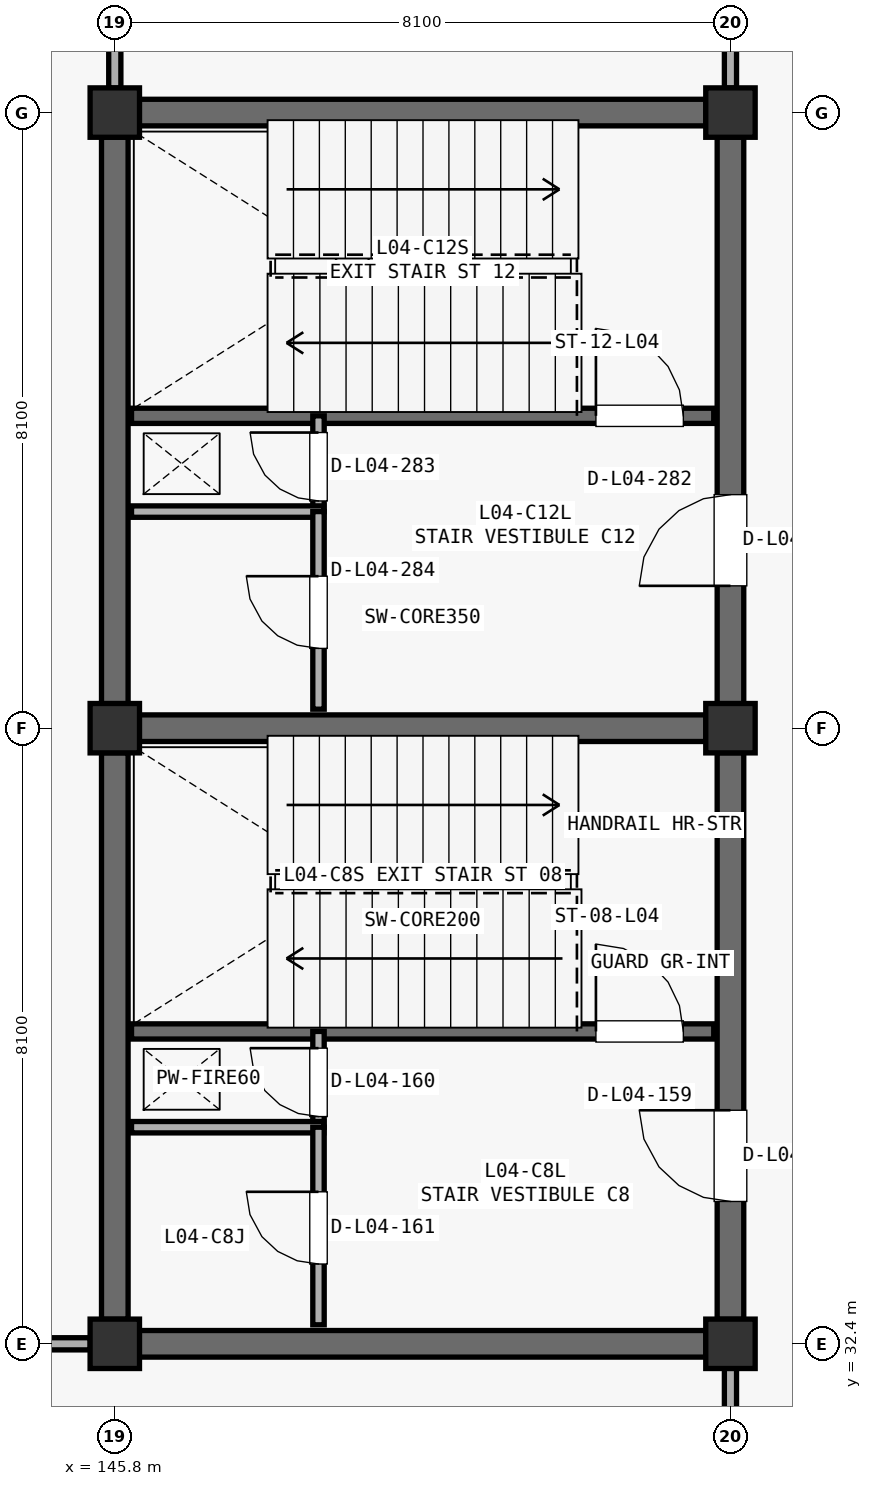
"""IFC4 building model, lengths in metres.
Left out: names, types, materials, properties, quantities, classifications, styles, units other than length and angle.
Written with IfcOpenShell. Run it as: python <this file> out.ifc"""

import sys

from ifc_helpers import new_model, si_unit, direction, frame, frame_2d, origin, origin_2d, place, context, subcontext, project, spatial, rectangle, extrude, element, fill, save


model = new_model("IFC4")
c1 = context("Model", 3, precision=1e-05, world=origin(), true_north=direction((0.0, 1.0)))
c2 = subcontext(c1, "Body", "Model", "MODEL_VIEW")
j1 = project(units=[si_unit("LENGTHUNIT", "METRE"), si_unit("PLANEANGLEUNIT", "RADIAN")], contexts=[c1])
p1 = place(None, origin())
s1 = spatial("IfcSite", under=j1, at=p1, CompositionType="ELEMENT")
p2 = place(p1, origin())
s2 = spatial("IfcBuilding", under=s1, at=p2, CompositionType="ELEMENT")
p3 = place(p2, frame((0.0, 0.0, 18.53)))
s3 = spatial("IfcBuildingStorey", under=s2, at=p3, CompositionType="ELEMENT", Elevation=18.53)
for number, where, z_axis, x_axis in (
    (1, (145.8, 32.4, 0.0), (0.0, 0.0, 1.0), (1.0, 0.0, 0.0)),
    (2, (145.8, 40.5, 0.0), (0.0, 0.0, 1.0), (1.0, 0.0, 0.0)),
    (3, (145.8, 48.6, 0.0), (0.0, 0.0, 1.0), (1.0, 0.0, 0.0)),
    (4, (153.9, 32.4, 0.0), (0.0, 0.0, 1.0), (1.0, 0.0, 0.0)),
    (5, (153.9, 40.5, 0.0), (0.0, 0.0, 1.0), (1.0, 0.0, 0.0)),
    (6, (153.9, 48.6, 0.0), (0.0, 0.0, 1.0), (1.0, 0.0, 0.0)),
):
    element("IfcColumn", number, at=place(p3, frame(where, z_axis=z_axis, x_axis=x_axis)), inside=s3, PredefinedType="COLUMN", context=c2, shape_type="SweptSolid", body=[
        extrude(rectangle(XDim=0.65, YDim=0.65, at=origin_2d()), origin(), (0.0, 0.0, 1.0), 4.42),
    ])
p4 = place(p3, frame((146.123, 40.5, 0.0), z_axis=(0.0, 0.0, 1.0), x_axis=(1.0, 0.0, 0.0)))
e7 = element("IfcWall", 7, at=p4, inside=s3, PredefinedType="SHEAR", context=c2, shape_type="SweptSolid", body=[
    extrude(rectangle(XDim=7.454, YDim=0.35, at=frame_2d((3.727, 0.0))), origin(), (0.0, 0.0, 1.0), 4.162),
])
p5 = place(p3, frame((145.8, 32.723, 0.0), z_axis=(0.0, 0.0, 1.0), x_axis=(0.0, 1.0, 0.0)))
e8 = element("IfcWall", 8, at=p5, inside=s3, PredefinedType="SHEAR", context=c2, shape_type="SweptSolid", body=[
    extrude(rectangle(XDim=7.454, YDim=0.35, at=frame_2d((3.727, 0.0))), origin(), (0.0, 0.0, 1.0), 4.162),
])
p6 = place(p3, frame((153.9, 32.723, 0.0), z_axis=(0.0, 0.0, 1.0), x_axis=(0.0, 1.0, 0.0)))
e9 = element("IfcWall", 9, at=p6, inside=s3, PredefinedType="SHEAR", context=c2, shape_type="SweptSolid", body=[
    extrude(rectangle(XDim=7.454, YDim=0.35, at=frame_2d((3.727, 0.0))), origin(), (0.0, 0.0, 1.0), 4.162),
])
p7 = place(p6, frame((1.55, 0.0, 0.0)))
e10 = element("IfcOpeningElement", 10, at=p7, cuts=e9, PredefinedType="OPENING", context=c2, shape_type="SweptSolid", body=[
    extrude(rectangle(XDim=1.2, YDim=2.2, at=frame_2d((0.6, 1.1))), frame((0.0, 0.185, 0.0), z_axis=(0.0, -1.0, 0.0), x_axis=(1.0, 0.0, 0.0)), (0.0, 0.0, 1.0), 0.37),
])
p8 = place(p3, frame((146.123, 32.4, 0.0), z_axis=(0.0, 0.0, 1.0), x_axis=(1.0, 0.0, 0.0)))
e11 = element("IfcWall", 11, at=p8, inside=s3, PredefinedType="SHEAR", context=c2, shape_type="SweptSolid", body=[
    extrude(rectangle(XDim=7.454, YDim=0.35, at=frame_2d((3.727, 0.0))), origin(), (0.0, 0.0, 1.0), 4.162),
])
p9 = place(p3, frame((146.02, 36.51, 0.0), z_axis=(0.0, 0.0, 1.0), x_axis=(1.0, 0.0, 0.0)))
e12 = element("IfcWall", 12, at=p9, inside=s3, PredefinedType="SHEAR", context=c2, shape_type="SweptSolid", body=[
    extrude(rectangle(XDim=7.66, YDim=0.2, at=frame_2d((3.83, 0.0))), origin(), (0.0, 0.0, 1.0), 4.162),
])
p10 = place(p9, frame((6.11, 0.0, 0.0)))
e13 = element("IfcOpeningElement", 13, at=p10, cuts=e12, PredefinedType="OPENING", context=c2, shape_type="SweptSolid", body=[
    extrude(rectangle(XDim=1.15, YDim=2.2, at=frame_2d((0.575, 1.1))), frame((0.0, 0.11, 0.0), z_axis=(0.0, -1.0, 0.0), x_axis=(1.0, 0.0, 0.0)), (0.0, 0.0, 1.0), 0.22),
])
p11 = place(p3, frame((148.48, 35.25, 0.0), z_axis=(0.0, 0.0, 1.0), x_axis=(0.0, 1.0, 0.0)))
e14 = element("IfcWall", 14, at=p11, inside=s3, PredefinedType="PARTITIONING", context=c2, shape_type="SweptSolid", body=[
    extrude(rectangle(XDim=1.26, YDim=0.15, at=frame_2d((0.63, 0.0))), origin(), (0.0, 0.0, 1.0), 4.162),
])
p12 = place(p11, frame((0.14, 0.0, 0.0)))
e15 = element("IfcOpeningElement", 15, at=p12, cuts=e14, PredefinedType="OPENING", context=c2, shape_type="SweptSolid", body=[
    extrude(rectangle(XDim=0.9, YDim=2.15, at=frame_2d((0.45, 1.075))), frame((0.0, 0.085, 0.0), z_axis=(0.0, -1.0, 0.0), x_axis=(1.0, 0.0, 0.0)), (0.0, 0.0, 1.0), 0.17),
])
p13 = place(p3, frame((146.02, 35.25, 0.0), z_axis=(0.0, 0.0, 1.0), x_axis=(1.0, 0.0, 0.0)))
e16 = element("IfcWall", 16, at=p13, inside=s3, PredefinedType="PARTITIONING", context=c2, shape_type="SweptSolid", body=[
    extrude(rectangle(XDim=2.53, YDim=0.15, at=frame_2d((1.265, 0.0))), origin(), (0.0, 0.0, 1.0), 4.162),
])
p14 = place(p3, frame((148.48, 32.65, 0.0), z_axis=(0.0, 0.0, 1.0), x_axis=(0.0, 1.0, 0.0)))
e17 = element("IfcWall", 17, at=p14, inside=s3, PredefinedType="PARTITIONING", context=c2, shape_type="SweptSolid", body=[
    extrude(rectangle(XDim=2.6, YDim=0.15, at=frame_2d((1.3, 0.0))), origin(), (0.0, 0.0, 1.0), 4.162),
])
p15 = place(p14, frame((0.8, 0.0, 0.0)))
e18 = element("IfcOpeningElement", 18, at=p15, cuts=e17, PredefinedType="OPENING", context=c2, shape_type="SweptSolid", body=[
    extrude(rectangle(XDim=0.95, YDim=2.15, at=frame_2d((0.475, 1.075))), frame((0.0, 0.085, 0.0), z_axis=(0.0, -1.0, 0.0), x_axis=(1.0, 0.0, 0.0)), (0.0, 0.0, 1.0), 0.17),
])
p16 = place(p3, frame((146.123, 48.6, 0.0), z_axis=(0.0, 0.0, 1.0), x_axis=(1.0, 0.0, 0.0)))
e19 = element("IfcWall", 19, at=p16, inside=s3, PredefinedType="SHEAR", context=c2, shape_type="SweptSolid", body=[
    extrude(rectangle(XDim=7.454, YDim=0.35, at=frame_2d((3.727, 0.0))), origin(), (0.0, 0.0, 1.0), 4.162),
])
p17 = place(p3, frame((145.8, 40.823, 0.0), z_axis=(0.0, 0.0, 1.0), x_axis=(0.0, 1.0, 0.0)))
e20 = element("IfcWall", 20, at=p17, inside=s3, PredefinedType="SHEAR", context=c2, shape_type="SweptSolid", body=[
    extrude(rectangle(XDim=7.454, YDim=0.35, at=frame_2d((3.727, 0.0))), origin(), (0.0, 0.0, 1.0), 4.162),
])
p18 = place(p3, frame((153.9, 40.823, 0.0), z_axis=(0.0, 0.0, 1.0), x_axis=(0.0, 1.0, 0.0)))
e21 = element("IfcWall", 21, at=p18, inside=s3, PredefinedType="SHEAR", context=c2, shape_type="SweptSolid", body=[
    extrude(rectangle(XDim=7.454, YDim=0.35, at=frame_2d((3.727, 0.0))), origin(), (0.0, 0.0, 1.0), 4.162),
])
p19 = place(p18, frame((1.55, 0.0, 0.0)))
e22 = element("IfcOpeningElement", 22, at=p19, cuts=e21, PredefinedType="OPENING", context=c2, shape_type="SweptSolid", body=[
    extrude(rectangle(XDim=1.2, YDim=2.2, at=frame_2d((0.6, 1.1))), frame((0.0, 0.185, 0.0), z_axis=(0.0, -1.0, 0.0), x_axis=(1.0, 0.0, 0.0)), (0.0, 0.0, 1.0), 0.37),
])
p20 = place(p3, frame((146.02, 44.61, 0.0), z_axis=(0.0, 0.0, 1.0), x_axis=(1.0, 0.0, 0.0)))
e23 = element("IfcWall", 23, at=p20, inside=s3, PredefinedType="SHEAR", context=c2, shape_type="SweptSolid", body=[
    extrude(rectangle(XDim=7.66, YDim=0.2, at=frame_2d((3.83, 0.0))), origin(), (0.0, 0.0, 1.0), 4.162),
])
p21 = place(p20, frame((6.11, 0.0, 0.0)))
e24 = element("IfcOpeningElement", 24, at=p21, cuts=e23, PredefinedType="OPENING", context=c2, shape_type="SweptSolid", body=[
    extrude(rectangle(XDim=1.15, YDim=2.2, at=frame_2d((0.575, 1.1))), frame((0.0, 0.11, 0.0), z_axis=(0.0, -1.0, 0.0), x_axis=(1.0, 0.0, 0.0)), (0.0, 0.0, 1.0), 0.22),
])
p22 = place(p3, frame((148.48, 43.35, 0.0), z_axis=(0.0, 0.0, 1.0), x_axis=(0.0, 1.0, 0.0)))
e25 = element("IfcWall", 25, at=p22, inside=s3, PredefinedType="PARTITIONING", context=c2, shape_type="SweptSolid", body=[
    extrude(rectangle(XDim=1.26, YDim=0.15, at=frame_2d((0.63, 0.0))), origin(), (0.0, 0.0, 1.0), 4.162),
])
p23 = place(p22, frame((0.14, 0.0, 0.0)))
e26 = element("IfcOpeningElement", 26, at=p23, cuts=e25, PredefinedType="OPENING", context=c2, shape_type="SweptSolid", body=[
    extrude(rectangle(XDim=0.9, YDim=2.15, at=frame_2d((0.45, 1.075))), frame((0.0, 0.085, 0.0), z_axis=(0.0, -1.0, 0.0), x_axis=(1.0, 0.0, 0.0)), (0.0, 0.0, 1.0), 0.17),
])
p24 = place(p3, frame((146.02, 43.35, 0.0), z_axis=(0.0, 0.0, 1.0), x_axis=(1.0, 0.0, 0.0)))
e27 = element("IfcWall", 27, at=p24, inside=s3, PredefinedType="PARTITIONING", context=c2, shape_type="SweptSolid", body=[
    extrude(rectangle(XDim=2.53, YDim=0.15, at=frame_2d((1.265, 0.0))), origin(), (0.0, 0.0, 1.0), 4.162),
])
p25 = place(p3, frame((148.48, 40.75, 0.0), z_axis=(0.0, 0.0, 1.0), x_axis=(0.0, 1.0, 0.0)))
e28 = element("IfcWall", 28, at=p25, inside=s3, PredefinedType="PARTITIONING", context=c2, shape_type="SweptSolid", body=[
    extrude(rectangle(XDim=2.6, YDim=0.15, at=frame_2d((1.3, 0.0))), origin(), (0.0, 0.0, 1.0), 4.162),
])
p26 = place(p25, frame((0.8, 0.0, 0.0)))
e29 = element("IfcOpeningElement", 29, at=p26, cuts=e28, PredefinedType="OPENING", context=c2, shape_type="SweptSolid", body=[
    extrude(rectangle(XDim=0.95, YDim=2.15, at=frame_2d((0.475, 1.075))), frame((0.0, 0.085, 0.0), z_axis=(0.0, -1.0, 0.0), x_axis=(1.0, 0.0, 0.0)), (0.0, 0.0, 1.0), 0.17),
])
p27 = place(p3, frame((153.9, 24.623, 0.0), z_axis=(0.0, 0.0, 1.0), x_axis=(0.0, 1.0, 0.0)))
e30 = element("IfcWall", 30, at=p27, inside=s3, PredefinedType="PARTITIONING", context=c2, shape_type="SweptSolid", body=[
    extrude(rectangle(XDim=7.454, YDim=0.16, at=frame_2d((3.727, 0.0))), origin(), (0.0, 0.0, 1.0), 3.512),
])
p28 = place(p3, frame((138.023, 32.4, 0.0), z_axis=(0.0, 0.0, 1.0), x_axis=(1.0, 0.0, 0.0)))
e31 = element("IfcWall", 31, at=p28, inside=s3, PredefinedType="PARTITIONING", context=c2, shape_type="SweptSolid", body=[
    extrude(rectangle(XDim=7.454, YDim=0.16, at=frame_2d((3.727, 0.0))), origin(), (0.0, 0.0, 1.0), 3.512),
])
p29 = place(p3, frame((145.8, 48.923, 0.0), z_axis=(0.0, 0.0, 1.0), x_axis=(0.0, 1.0, 0.0)))
e32 = element("IfcWall", 32, at=p29, inside=s3, PredefinedType="PARTITIONING", context=c2, shape_type="SweptSolid", body=[
    extrude(rectangle(XDim=7.454, YDim=0.16, at=frame_2d((3.727, 0.0))), origin(), (0.0, 0.0, 1.0), 3.562),
])
p30 = place(p29, frame((3.127, 0.0, 0.0)))
e33 = element("IfcOpeningElement", 33, at=p30, cuts=e32, PredefinedType="OPENING", context=c2, shape_type="SweptSolid", body=[
    extrude(rectangle(XDim=1.2, YDim=2.2, at=frame_2d((0.6, 1.1))), frame((0.0, 0.09, 0.0), z_axis=(0.0, -1.0, 0.0), x_axis=(1.0, 0.0, 0.0)), (0.0, 0.0, 1.0), 0.18),
])
p31 = place(p3, frame((153.9, 48.923, 0.0), z_axis=(0.0, 0.0, 1.0), x_axis=(0.0, 1.0, 0.0)))
e34 = element("IfcWall", 34, at=p31, inside=s3, PredefinedType="PARTITIONING", context=c2, shape_type="SweptSolid", body=[
    extrude(rectangle(XDim=7.454, YDim=0.16, at=frame_2d((3.727, 0.0))), origin(), (0.0, 0.0, 1.0), 3.212),
])
p32 = place(p31, frame((2.867, 0.0, 0.0)))
e35 = element("IfcOpeningElement", 35, at=p32, cuts=e34, PredefinedType="OPENING", context=c2, shape_type="SweptSolid", body=[
    extrude(rectangle(XDim=1.72, YDim=2.3, at=frame_2d((0.86, 1.15))), frame((0.0, 0.09, 0.0), z_axis=(0.0, -1.0, 0.0), x_axis=(1.0, 0.0, 0.0)), (0.0, 0.0, 1.0), 0.18),
])
p33 = place(p7, origin())
e36 = element("IfcDoor", 36, at=p33, inside=s3, OperationType="SINGLE_SWING_RIGHT", PredefinedType="DOOR", context=c2, shape_type="SweptSolid", body=[
    extrude(rectangle(XDim=1.2, YDim=2.2, at=frame_2d((0.6, 1.1))), frame((0.0, 0.025, 0.0), z_axis=(0.0, -1.0, 0.0), x_axis=(1.0, 0.0, 0.0)), (0.0, 0.0, 1.0), 0.05),
])
fill(e10, e36)
p34 = place(p10, origin())
e37 = element("IfcDoor", 37, at=p34, inside=s3, OperationType="SINGLE_SWING_LEFT", PredefinedType="DOOR", context=c2, shape_type="SweptSolid", body=[
    extrude(rectangle(XDim=1.15, YDim=2.2, at=frame_2d((0.575, 1.1))), frame((0.0, 0.025, 0.0), z_axis=(0.0, -1.0, 0.0), x_axis=(1.0, 0.0, 0.0)), (0.0, 0.0, 1.0), 0.05),
])
fill(e13, e37)
p35 = place(p12, origin())
e38 = element("IfcDoor", 38, at=p35, inside=s3, OperationType="SINGLE_SWING_RIGHT", PredefinedType="DOOR", context=c2, shape_type="SweptSolid", body=[
    extrude(rectangle(XDim=0.9, YDim=2.15, at=frame_2d((0.45, 1.075))), frame((0.0, 0.025, 0.0), z_axis=(0.0, -1.0, 0.0), x_axis=(1.0, 0.0, 0.0)), (0.0, 0.0, 1.0), 0.05),
])
fill(e15, e38)
p36 = place(p15, origin())
e39 = element("IfcDoor", 39, at=p36, inside=s3, OperationType="SINGLE_SWING_RIGHT", PredefinedType="DOOR", context=c2, shape_type="SweptSolid", body=[
    extrude(rectangle(XDim=0.95, YDim=2.15, at=frame_2d((0.475, 1.075))), frame((0.0, 0.025, 0.0), z_axis=(0.0, -1.0, 0.0), x_axis=(1.0, 0.0, 0.0)), (0.0, 0.0, 1.0), 0.05),
])
fill(e18, e39)
p37 = place(p19, origin())
e40 = element("IfcDoor", 40, at=p37, inside=s3, OperationType="SINGLE_SWING_LEFT", PredefinedType="DOOR", context=c2, shape_type="SweptSolid", body=[
    extrude(rectangle(XDim=1.2, YDim=2.2, at=frame_2d((0.6, 1.1))), frame((0.0, 0.025, 0.0), z_axis=(0.0, -1.0, 0.0), x_axis=(1.0, 0.0, 0.0)), (0.0, 0.0, 1.0), 0.05),
])
fill(e22, e40)
p38 = place(p21, origin())
e41 = element("IfcDoor", 41, at=p38, inside=s3, OperationType="SINGLE_SWING_LEFT", PredefinedType="DOOR", context=c2, shape_type="SweptSolid", body=[
    extrude(rectangle(XDim=1.15, YDim=2.2, at=frame_2d((0.575, 1.1))), frame((0.0, 0.025, 0.0), z_axis=(0.0, -1.0, 0.0), x_axis=(1.0, 0.0, 0.0)), (0.0, 0.0, 1.0), 0.05),
])
fill(e24, e41)
p39 = place(p23, origin())
e42 = element("IfcDoor", 42, at=p39, inside=s3, OperationType="SINGLE_SWING_RIGHT", PredefinedType="DOOR", context=c2, shape_type="SweptSolid", body=[
    extrude(rectangle(XDim=0.9, YDim=2.15, at=frame_2d((0.45, 1.075))), frame((0.0, 0.025, 0.0), z_axis=(0.0, -1.0, 0.0), x_axis=(1.0, 0.0, 0.0)), (0.0, 0.0, 1.0), 0.05),
])
fill(e26, e42)
p40 = place(p26, origin())
e43 = element("IfcDoor", 43, at=p40, inside=s3, OperationType="SINGLE_SWING_RIGHT", PredefinedType="DOOR", context=c2, shape_type="SweptSolid", body=[
    extrude(rectangle(XDim=0.95, YDim=2.15, at=frame_2d((0.475, 1.075))), frame((0.0, 0.025, 0.0), z_axis=(0.0, -1.0, 0.0), x_axis=(1.0, 0.0, 0.0)), (0.0, 0.0, 1.0), 0.05),
])
fill(e29, e43)
save(model, sys.argv[1])
